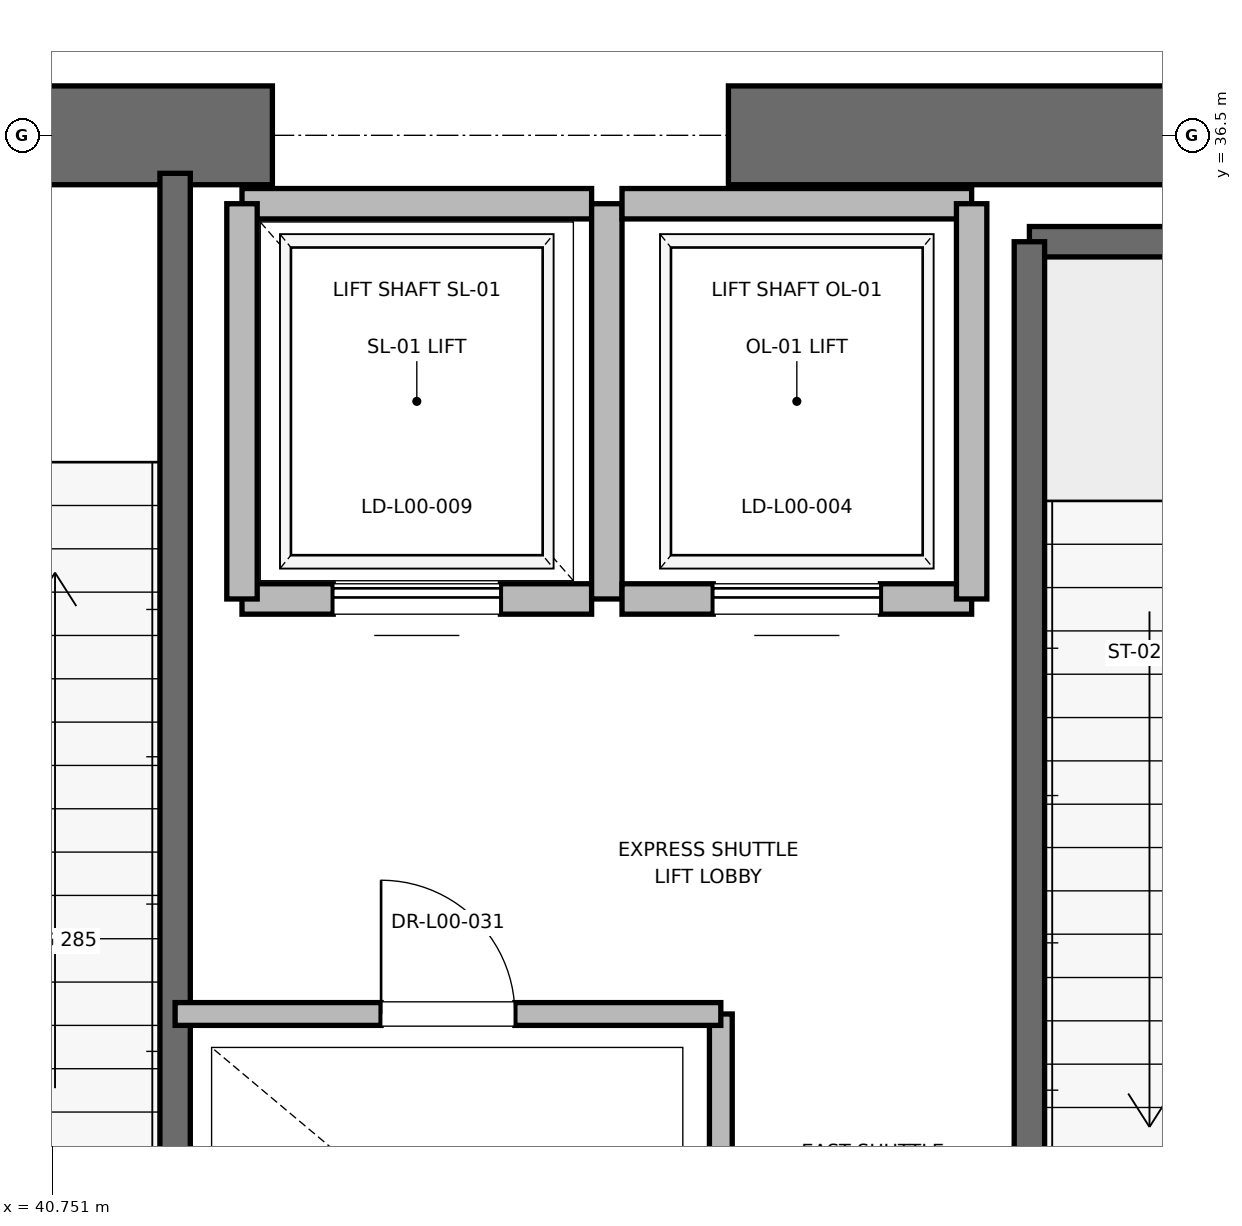
"""IFC4 building model, lengths in metres.
Left out: names, types, materials, properties, quantities, classifications, styles, units other than length and angle.
Written with IfcOpenShell. Run it as: python <this file> out.ifc"""

import sys

from ifc_helpers import new_model, si_unit, direction, frame, frame_2d, origin, place, context, subcontext, project, spatial, rectangle, extrude, element, fill, save


model = new_model("IFC4")
c1 = context("Model", 3, precision=1e-05, world=origin(), true_north=direction((0.0, 1.0)))
c2 = subcontext(c1, "Body", "Model", "MODEL_VIEW")
j1 = project(units=[si_unit("LENGTHUNIT", "METRE"), si_unit("PLANEANGLEUNIT", "RADIAN")], contexts=[c1])
p1 = place(None, origin())
s1 = spatial("IfcSite", under=j1, at=p1, CompositionType="ELEMENT")
p2 = place(p1, origin())
s2 = spatial("IfcBuilding", under=s1, at=p2, CompositionType="ELEMENT")
p3 = place(p2, origin())
s3 = spatial("IfcBuildingStorey", under=s2, at=p3, CompositionType="ELEMENT", Elevation=0.0)
p4 = place(p3, frame((37.8, 36.5, 0.0), z_axis=(0.0, 0.0, 1.0), x_axis=(1.0, 0.0, 0.0)))
e1 = element("IfcWall", 1, at=p4, inside=s3, PredefinedType="SHEAR", context=c2, shape_type="SweptSolid", body=[
    extrude(rectangle(XDim=4.4, YDim=0.65, at=frame_2d((2.2, 0.0))), origin(), (0.0, 0.0, 1.0), 5.72),
])
p5 = place(p4, frame((1.65, 0.0, 0.0)))
e2 = element("IfcOpeningElement", 2, at=p5, cuts=e1, PredefinedType="OPENING", context=c2, shape_type="SweptSolid", body=[
    extrude(rectangle(XDim=1.1, YDim=2.15, at=frame_2d((0.55, 1.075))), frame((0.0, 0.325, 0.0), z_axis=(0.0, -1.0, 0.0), x_axis=(1.0, 0.0, 0.0)), (0.0, 0.0, 1.0), 0.65),
])
p6 = place(p3, frame((45.2, 36.5, 0.0), z_axis=(0.0, 0.0, 1.0), x_axis=(1.0, 0.0, 0.0)))
e3 = element("IfcWall", 3, at=p6, inside=s3, PredefinedType="SHEAR", context=c2, shape_type="SweptSolid", body=[
    extrude(rectangle(XDim=5.8, YDim=0.65, at=frame_2d((2.9, 0.0))), origin(), (0.0, 0.0, 1.0), 5.72),
])
p7 = place(p3, frame((47.18, 35.8, 0.0), z_axis=(0.0, 0.0, 1.0), x_axis=(1.0, 0.0, 0.0)))
e4 = element("IfcWall", 4, at=p7, inside=s3, PredefinedType="SOLIDWALL", context=c2, shape_type="SweptSolid", body=[
    extrude(rectangle(XDim=3.12, YDim=0.2, at=frame_2d((1.56, 0.0))), origin(), (0.0, 0.0, 1.0), 5.72),
])
p8 = place(p3, frame((47.18, 27.62, 0.0), z_axis=(0.0, 0.0, 1.0), x_axis=(0.0, 1.0, 0.0)))
e5 = element("IfcWall", 5, at=p8, inside=s3, PredefinedType="SOLIDWALL", context=c2, shape_type="SweptSolid", body=[
    extrude(rectangle(XDim=8.18, YDim=0.2, at=frame_2d((4.09, 0.0))), origin(), (0.0, 0.0, 1.0), 5.72),
])
p9 = place(p3, frame((41.56, 27.68, 0.0), z_axis=(0.0, 0.0, 1.0), x_axis=(0.0, 1.0, 0.0)))
e6 = element("IfcWall", 6, at=p9, inside=s3, PredefinedType="SOLIDWALL", context=c2, shape_type="SweptSolid", body=[
    extrude(rectangle(XDim=8.57, YDim=0.2, at=frame_2d((4.285, 0.0))), origin(), (0.0, 0.0, 1.0), 5.72),
])
p10 = place(p3, frame((42.0, 33.45, 0.0), z_axis=(0.0, 0.0, 1.0), x_axis=(1.0, 0.0, 0.0)))
e7 = element("IfcWall", 7, at=p10, inside=s3, PredefinedType="SOLIDWALL", context=c2, shape_type="SweptSolid", body=[
    extrude(rectangle(XDim=2.3, YDim=0.2, at=frame_2d((1.15, 0.0))), origin(), (0.0, 0.0, 1.0), 5.72),
])
p11 = place(p10, frame((0.6, 0.0, 0.0)))
e8 = element("IfcOpeningElement", 8, at=p11, cuts=e7, PredefinedType="OPENING", context=c2, shape_type="SweptSolid", body=[
    extrude(rectangle(XDim=1.1, YDim=2.2, at=frame_2d((0.55, 1.1))), frame((0.0, 0.1, 0.0), z_axis=(0.0, -1.0, 0.0), x_axis=(1.0, 0.0, 0.0)), (0.0, 0.0, 1.0), 0.2),
])
p12 = place(p3, frame((44.3, 36.05, 0.0), z_axis=(0.0, 0.0, 1.0), x_axis=(-1.0, 0.0, 0.0)))
e9 = element("IfcWall", 9, at=p12, inside=s3, PredefinedType="SOLIDWALL", context=c2, shape_type="SweptSolid", body=[
    extrude(rectangle(XDim=2.3, YDim=0.2, at=frame_2d((1.15, 0.0))), origin(), (0.0, 0.0, 1.0), 4.5),
])
for number, where, z_axis, x_axis in (
    (10, (42.0, 36.05, 0.0), (0.0, 0.0, 1.0), (0.0, -1.0, 0.0)),
    (11, (44.4, 33.45, 0.0), (0.0, 0.0, 1.0), (0.0, 1.0, 0.0)),
):
    element("IfcWall", number, at=place(p3, frame(where, z_axis=z_axis, x_axis=x_axis)), inside=s3, PredefinedType="SOLIDWALL", context=c2, shape_type="SweptSolid", body=[
        extrude(rectangle(XDim=2.6, YDim=0.2, at=frame_2d((1.3, 0.0))), origin(), (0.0, 0.0, 1.0), 4.5),
    ])
p13 = place(p3, frame((44.5, 33.45, 0.0), z_axis=(0.0, 0.0, 1.0), x_axis=(1.0, 0.0, 0.0)))
e12 = element("IfcWall", 12, at=p13, inside=s3, PredefinedType="SOLIDWALL", context=c2, shape_type="SweptSolid", body=[
    extrude(rectangle(XDim=2.3, YDim=0.2, at=frame_2d((1.15, 0.0))), origin(), (0.0, 0.0, 1.0), 5.72),
])
p14 = place(p13, frame((0.6, 0.0, 0.0)))
e13 = element("IfcOpeningElement", 13, at=p14, cuts=e12, PredefinedType="OPENING", context=c2, shape_type="SweptSolid", body=[
    extrude(rectangle(XDim=1.1, YDim=2.2, at=frame_2d((0.55, 1.1))), frame((0.0, 0.1, 0.0), z_axis=(0.0, -1.0, 0.0), x_axis=(1.0, 0.0, 0.0)), (0.0, 0.0, 1.0), 0.2),
])
p15 = place(p3, frame((46.8, 36.05, 0.0), z_axis=(0.0, 0.0, 1.0), x_axis=(-1.0, 0.0, 0.0)))
e14 = element("IfcWall", 14, at=p15, inside=s3, PredefinedType="SOLIDWALL", context=c2, shape_type="SweptSolid", body=[
    extrude(rectangle(XDim=2.3, YDim=0.2, at=frame_2d((1.15, 0.0))), origin(), (0.0, 0.0, 1.0), 4.5),
])
p16 = place(p3, frame((46.8, 33.45, 0.0), z_axis=(0.0, 0.0, 1.0), x_axis=(0.0, 1.0, 0.0)))
e15 = element("IfcWall", 15, at=p16, inside=s3, PredefinedType="SOLIDWALL", context=c2, shape_type="SweptSolid", body=[
    extrude(rectangle(XDim=2.6, YDim=0.2, at=frame_2d((1.3, 0.0))), origin(), (0.0, 0.0, 1.0), 5.72),
])
p17 = place(p3, frame((45.15, 27.62, 0.0), z_axis=(0.0, 0.0, 1.0), x_axis=(0.0, 1.0, 0.0)))
e16 = element("IfcWall", 16, at=p17, inside=s3, PredefinedType="PARTITIONING", context=c2, shape_type="SweptSolid", body=[
    extrude(rectangle(XDim=3.1, YDim=0.15, at=frame_2d((1.55, 0.0))), origin(), (0.0, 0.0, 1.0), 2.85),
])
p18 = place(p3, frame((41.56, 30.72, 0.0), z_axis=(0.0, 0.0, 1.0), x_axis=(1.0, 0.0, 0.0)))
e17 = element("IfcWall", 17, at=p18, inside=s3, PredefinedType="PARTITIONING", context=c2, shape_type="SweptSolid", body=[
    extrude(rectangle(XDim=3.59, YDim=0.15, at=frame_2d((1.795, 0.0))), origin(), (0.0, 0.0, 1.0), 2.85),
])
p19 = place(p18, frame((1.355, 0.0, 0.0)))
e18 = element("IfcOpeningElement", 18, at=p19, cuts=e17, PredefinedType="OPENING", context=c2, shape_type="SweptSolid", body=[
    extrude(rectangle(XDim=0.88, YDim=2.1, at=frame_2d((0.44, 1.05))), frame((0.0, 0.075, 0.0), z_axis=(0.0, -1.0, 0.0), x_axis=(1.0, 0.0, 0.0)), (0.0, 0.0, 1.0), 0.15),
])
p20 = place(p11, origin())
e19 = element("IfcDoor", 19, at=p20, inside=s3, OperationType="SLIDING_TO_RIGHT", PredefinedType="DOOR", context=c2, shape_type="SweptSolid", body=[
    extrude(rectangle(XDim=1.1, YDim=2.2, at=frame_2d((0.55, 1.1))), frame((0.0, 0.025, 0.0), z_axis=(0.0, -1.0, 0.0), x_axis=(1.0, 0.0, 0.0)), (0.0, 0.0, 1.0), 0.05),
])
fill(e8, e19)
p21 = place(p14, origin())
e20 = element("IfcDoor", 20, at=p21, inside=s3, OperationType="SLIDING_TO_RIGHT", PredefinedType="DOOR", context=c2, shape_type="SweptSolid", body=[
    extrude(rectangle(XDim=1.1, YDim=2.2, at=frame_2d((0.55, 1.1))), frame((0.0, 0.025, 0.0), z_axis=(0.0, -1.0, 0.0), x_axis=(1.0, 0.0, 0.0)), (0.0, 0.0, 1.0), 0.05),
])
fill(e13, e20)
p22 = place(p19, origin())
e21 = element("IfcDoor", 21, at=p22, inside=s3, OperationType="SINGLE_SWING_LEFT", PredefinedType="DOOR", context=c2, shape_type="SweptSolid", body=[
    extrude(rectangle(XDim=0.88, YDim=2.1, at=frame_2d((0.44, 1.05))), frame((0.0, 0.025, 0.0), z_axis=(0.0, -1.0, 0.0), x_axis=(1.0, 0.0, 0.0)), (0.0, 0.0, 1.0), 0.05),
])
fill(e18, e21)
save(model, sys.argv[1])
